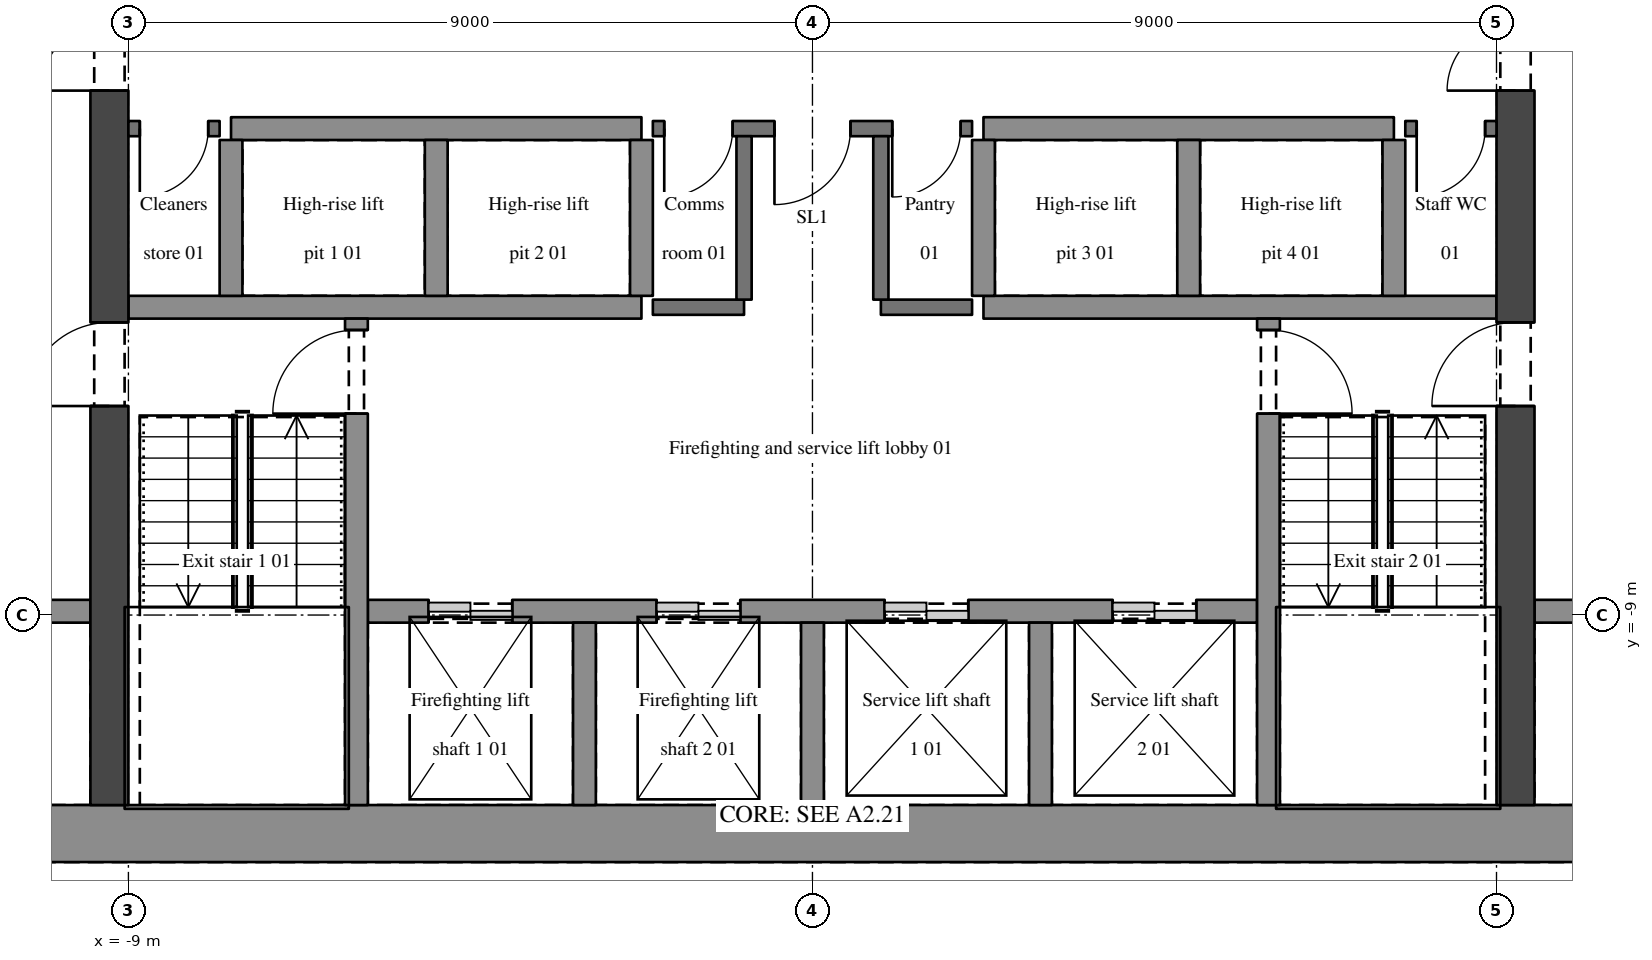
"""IFC4 building model, lengths in metres.
Left out: names, types, materials, properties, quantities, classifications, styles, units other than length and angle.
Written with IfcOpenShell. Run it as: python <this file> out.ifc"""

import sys

from ifc_helpers import new_model, si_unit, direction, frame, frame_2d, origin, place, context, subcontext, project, spatial, rectangle, extrude, element, fill, save


model = new_model("IFC4")
c1 = context("Model", 3, precision=1e-05, world=origin(), true_north=direction((0.0, 1.0)))
c2 = subcontext(c1, "Body", "Model", "MODEL_VIEW")
j1 = project(units=[si_unit("LENGTHUNIT", "METRE"), si_unit("PLANEANGLEUNIT", "RADIAN")], contexts=[c1])
p1 = place(None, origin())
s1 = spatial("IfcSite", under=j1, at=p1, CompositionType="ELEMENT")
p2 = place(p1, origin())
s2 = spatial("IfcBuilding", under=s1, at=p2, CompositionType="ELEMENT")
p3 = place(p2, frame((0.0, 0.0, 158.9)))
s3 = spatial("IfcBuildingStorey", under=s2, at=p3, CompositionType="ELEMENT", Elevation=158.9)
p4 = place(p3, frame((-13.0, -11.875, 0.0), z_axis=(0.0, 0.0, 1.0), x_axis=(1.0, 0.0, 0.0)))
e1 = element("IfcWall", 1, at=p4, inside=s3, PredefinedType="SHEAR", context=c2, shape_type="SweptSolid", body=[
    extrude(rectangle(XDim=26.0, YDim=0.75, at=frame_2d((13.0, 0.0))), origin(), (0.0, 0.0, 1.0), 3.4),
])
p5 = place(p3, frame((-9.25, -11.5, 0.0), z_axis=(0.0, 0.0, 1.0), x_axis=(0.0, 1.0, 0.0)))
e2 = element("IfcWall", 2, at=p5, inside=s3, PredefinedType="SHEAR", context=c2, shape_type="SweptSolid", body=[
    extrude(rectangle(XDim=11.65, YDim=0.5, at=frame_2d((5.825, 0.0))), origin(), (0.0, 0.0, 1.0), 3.4),
])
p6 = place(p5, frame((9.4, 0.0, 0.0)))
e3 = element("IfcOpeningElement", 3, at=p6, cuts=e2, PredefinedType="OPENING", context=c2, shape_type="SweptSolid", body=[
    extrude(rectangle(XDim=1.8, YDim=2.1, at=frame_2d((0.9, 1.05))), frame((0.0, 0.26, 0.0), z_axis=(0.0, -1.0, 0.0), x_axis=(1.0, 0.0, 0.0)), (0.0, 0.0, 1.0), 0.52),
])
p7 = place(p5, frame((5.25, 0.0, 0.0)))
e4 = element("IfcOpeningElement", 4, at=p7, cuts=e2, PredefinedType="OPENING", context=c2, shape_type="SweptSolid", body=[
    extrude(rectangle(XDim=1.1, YDim=2.1, at=frame_2d((0.55, 1.05))), frame((0.0, 0.26, 0.0), z_axis=(0.0, -1.0, 0.0), x_axis=(1.0, 0.0, 0.0)), (0.0, 0.0, 1.0), 0.52),
])
p8 = place(p3, frame((9.25, -11.5, 0.0), z_axis=(0.0, 0.0, 1.0), x_axis=(0.0, 1.0, 0.0)))
e5 = element("IfcWall", 5, at=p8, inside=s3, PredefinedType="SHEAR", context=c2, shape_type="SweptSolid", body=[
    extrude(rectangle(XDim=11.65, YDim=0.5, at=frame_2d((5.825, 0.0))), origin(), (0.0, 0.0, 1.0), 3.4),
])
p9 = place(p8, frame((9.4, 0.0, 0.0)))
e6 = element("IfcOpeningElement", 6, at=p9, cuts=e5, PredefinedType="OPENING", context=c2, shape_type="SweptSolid", body=[
    extrude(rectangle(XDim=1.8, YDim=2.1, at=frame_2d((0.9, 1.05))), frame((0.0, 0.26, 0.0), z_axis=(0.0, -1.0, 0.0), x_axis=(1.0, 0.0, 0.0)), (0.0, 0.0, 1.0), 0.52),
])
p10 = place(p8, frame((5.25, 0.0, 0.0)))
e7 = element("IfcOpeningElement", 7, at=p10, cuts=e5, PredefinedType="OPENING", context=c2, shape_type="SweptSolid", body=[
    extrude(rectangle(XDim=1.1, YDim=2.1, at=frame_2d((0.55, 1.05))), frame((0.0, 0.26, 0.0), z_axis=(0.0, -1.0, 0.0), x_axis=(1.0, 0.0, 0.0)), (0.0, 0.0, 1.0), 0.52),
])
p11 = place(p3, frame((-12.25, -8.95, 0.0), z_axis=(0.0, 0.0, 1.0), x_axis=(1.0, 0.0, 0.0)))
e8 = element("IfcWall", 8, at=p11, inside=s3, PredefinedType="SHEAR", context=c2, shape_type="SweptSolid", body=[
    extrude(rectangle(XDim=2.75, YDim=0.3, at=frame_2d((1.375, 0.0))), origin(), (0.0, 0.0, 1.0), 3.4),
])
p12 = place(p3, frame((-5.85, -8.95, 0.0), z_axis=(0.0, 0.0, 1.0), x_axis=(1.0, 0.0, 0.0)))
e9 = element("IfcWall", 9, at=p12, inside=s3, PredefinedType="SHEAR", context=c2, shape_type="SweptSolid", body=[
    extrude(rectangle(XDim=11.7, YDim=0.3, at=frame_2d((5.85, 0.0))), origin(), (0.0, 0.0, 1.0), 3.4),
])
p13 = place(p12, frame((0.8, 0.0, 0.0)))
e10 = element("IfcOpeningElement", 10, at=p13, cuts=e9, PredefinedType="OPENING", context=c2, shape_type="SweptSolid", body=[
    extrude(rectangle(XDim=1.1, YDim=2.1, at=frame_2d((0.55, 1.05))), frame((0.0, 0.16, 0.0), z_axis=(0.0, -1.0, 0.0), x_axis=(1.0, 0.0, 0.0)), (0.0, 0.0, 1.0), 0.32),
])
p14 = place(p12, frame((3.8, 0.0, 0.0)))
e11 = element("IfcOpeningElement", 11, at=p14, cuts=e9, PredefinedType="OPENING", context=c2, shape_type="SweptSolid", body=[
    extrude(rectangle(XDim=1.1, YDim=2.1, at=frame_2d((0.55, 1.05))), frame((0.0, 0.16, 0.0), z_axis=(0.0, -1.0, 0.0), x_axis=(1.0, 0.0, 0.0)), (0.0, 0.0, 1.0), 0.32),
])
p15 = place(p12, frame((6.8, 0.0, 0.0)))
e12 = element("IfcOpeningElement", 12, at=p15, cuts=e9, PredefinedType="OPENING", context=c2, shape_type="SweptSolid", body=[
    extrude(rectangle(XDim=1.1, YDim=2.1, at=frame_2d((0.55, 1.05))), frame((0.0, 0.16, 0.0), z_axis=(0.0, -1.0, 0.0), x_axis=(1.0, 0.0, 0.0)), (0.0, 0.0, 1.0), 0.32),
])
p16 = place(p12, frame((9.8, 0.0, 0.0)))
e13 = element("IfcOpeningElement", 13, at=p16, cuts=e9, PredefinedType="OPENING", context=c2, shape_type="SweptSolid", body=[
    extrude(rectangle(XDim=1.1, YDim=2.1, at=frame_2d((0.55, 1.05))), frame((0.0, 0.16, 0.0), z_axis=(0.0, -1.0, 0.0), x_axis=(1.0, 0.0, 0.0)), (0.0, 0.0, 1.0), 0.32),
])
p17 = place(p3, frame((9.5, -8.95, 0.0), z_axis=(0.0, 0.0, 1.0), x_axis=(1.0, 0.0, 0.0)))
e14 = element("IfcWall", 14, at=p17, inside=s3, PredefinedType="SHEAR", context=c2, shape_type="SweptSolid", body=[
    extrude(rectangle(XDim=2.75, YDim=0.3, at=frame_2d((1.375, 0.0))), origin(), (0.0, 0.0, 1.0), 3.4),
])
p18 = place(p3, frame((-9.0, -4.95, 0.0), z_axis=(0.0, 0.0, 1.0), x_axis=(1.0, 0.0, 0.0)))
e15 = element("IfcWall", 15, at=p18, inside=s3, PredefinedType="SHEAR", context=c2, shape_type="SweptSolid", body=[
    extrude(rectangle(XDim=6.75, YDim=0.3, at=frame_2d((3.375, 0.0))), origin(), (0.0, 0.0, 1.0), 3.4),
])
for number, where, z_axis, x_axis in (
    (16, (-2.1, -4.95, 0.0), (0.0, 0.0, 1.0), (1.0, 0.0, 0.0)),
    (17, (0.9, -4.95, 0.0), (0.0, 0.0, 1.0), (1.0, 0.0, 0.0)),
):
    element("IfcWall", number, at=place(p3, frame(where, z_axis=z_axis, x_axis=x_axis)), inside=s3, PredefinedType="SOLIDWALL", context=c2, shape_type="SweptSolid", body=[
        extrude(rectangle(XDim=1.2, YDim=0.2, at=frame_2d((0.6, 0.0))), origin(), (0.0, 0.0, 1.0), 3.1),
    ])
p19 = place(p3, frame((2.25, -4.95, 0.0), z_axis=(0.0, 0.0, 1.0), x_axis=(1.0, 0.0, 0.0)))
e18 = element("IfcWall", 18, at=p19, inside=s3, PredefinedType="SHEAR", context=c2, shape_type="SweptSolid", body=[
    extrude(rectangle(XDim=6.75, YDim=0.3, at=frame_2d((3.375, 0.0))), origin(), (0.0, 0.0, 1.0), 3.4),
])
p20 = place(p3, frame((-7.8, -2.6, 0.0), z_axis=(0.0, 0.0, 1.0), x_axis=(-1.0, 0.0, 0.0)))
e19 = element("IfcWall", 19, at=p20, inside=s3, PredefinedType="SOLIDWALL", context=c2, shape_type="SweptSolid", body=[
    extrude(rectangle(XDim=1.2, YDim=0.2, at=frame_2d((0.6, 0.0))), origin(), (0.0, 0.0, 1.0), 3.1),
])
p21 = place(p20, frame((0.15, 0.0, 0.0)))
e20 = element("IfcOpeningElement", 20, at=p21, cuts=e19, PredefinedType="OPENING", context=c2, shape_type="SweptSolid", body=[
    extrude(rectangle(XDim=0.9, YDim=2.1, at=frame_2d((0.45, 1.05))), frame((0.0, 0.11, 0.0), z_axis=(0.0, -1.0, 0.0), x_axis=(1.0, 0.0, 0.0)), (0.0, 0.0, 1.0), 0.22),
])
p22 = place(p3, frame((-7.65, -2.6, 0.0), z_axis=(0.0, 0.0, 1.0), x_axis=(1.0, 0.0, 0.0)))
e21 = element("IfcWall", 21, at=p22, inside=s3, PredefinedType="SHEAR", context=c2, shape_type="SweptSolid", body=[
    extrude(rectangle(XDim=5.4, YDim=0.3, at=frame_2d((2.7, 0.0))), origin(), (0.0, 0.0, 1.0), 3.4),
])
p23 = place(p3, frame((2.1, -2.6, 0.0), z_axis=(0.0, 0.0, 1.0), x_axis=(-1.0, 0.0, 0.0)))
e22 = element("IfcWall", 22, at=p23, inside=s3, PredefinedType="SOLIDWALL", context=c2, shape_type="SweptSolid", body=[
    extrude(rectangle(XDim=4.2, YDim=0.2, at=frame_2d((2.1, 0.0))), origin(), (0.0, 0.0, 1.0), 3.1),
])
p24 = place(p23, frame((1.6, 0.0, 0.0)))
e23 = element("IfcOpeningElement", 23, at=p24, cuts=e22, PredefinedType="OPENING", context=c2, shape_type="SweptSolid", body=[
    extrude(rectangle(XDim=1.0, YDim=2.1, at=frame_2d((0.5, 1.05))), frame((0.0, 0.11, 0.0), z_axis=(0.0, -1.0, 0.0), x_axis=(1.0, 0.0, 0.0)), (0.0, 0.0, 1.0), 0.22),
])
p25 = place(p23, frame((3.15, 0.0, 0.0)))
e24 = element("IfcOpeningElement", 24, at=p25, cuts=e22, PredefinedType="OPENING", context=c2, shape_type="SweptSolid", body=[
    extrude(rectangle(XDim=0.9, YDim=2.1, at=frame_2d((0.45, 1.05))), frame((0.0, 0.11, 0.0), z_axis=(0.0, -1.0, 0.0), x_axis=(1.0, 0.0, 0.0)), (0.0, 0.0, 1.0), 0.22),
])
p26 = place(p23, frame((0.15, 0.0, 0.0)))
e25 = element("IfcOpeningElement", 25, at=p26, cuts=e22, PredefinedType="OPENING", context=c2, shape_type="SweptSolid", body=[
    extrude(rectangle(XDim=0.9, YDim=2.1, at=frame_2d((0.45, 1.05))), frame((0.0, 0.11, 0.0), z_axis=(0.0, -1.0, 0.0), x_axis=(1.0, 0.0, 0.0)), (0.0, 0.0, 1.0), 0.22),
])
p27 = place(p3, frame((2.25, -2.6, 0.0), z_axis=(0.0, 0.0, 1.0), x_axis=(1.0, 0.0, 0.0)))
e26 = element("IfcWall", 26, at=p27, inside=s3, PredefinedType="SHEAR", context=c2, shape_type="SweptSolid", body=[
    extrude(rectangle(XDim=5.4, YDim=0.3, at=frame_2d((2.7, 0.0))), origin(), (0.0, 0.0, 1.0), 3.4),
])
p28 = place(p3, frame((9.0, -2.6, 0.0), z_axis=(0.0, 0.0, 1.0), x_axis=(-1.0, 0.0, 0.0)))
e27 = element("IfcWall", 27, at=p28, inside=s3, PredefinedType="SOLIDWALL", context=c2, shape_type="SweptSolid", body=[
    extrude(rectangle(XDim=1.2, YDim=0.2, at=frame_2d((0.6, 0.0))), origin(), (0.0, 0.0, 1.0), 3.1),
])
p29 = place(p28, frame((0.15, 0.0, 0.0)))
e28 = element("IfcOpeningElement", 28, at=p29, cuts=e27, PredefinedType="OPENING", context=c2, shape_type="SweptSolid", body=[
    extrude(rectangle(XDim=0.9, YDim=2.1, at=frame_2d((0.45, 1.05))), frame((0.0, 0.11, 0.0), z_axis=(0.0, -1.0, 0.0), x_axis=(1.0, 0.0, 0.0)), (0.0, 0.0, 1.0), 0.22),
])
p30 = place(p3, frame((-7.65, -4.8, 0.0), z_axis=(0.0, 0.0, 1.0), x_axis=(0.0, 1.0, 0.0)))
e29 = element("IfcWall", 29, at=p30, inside=s3, PredefinedType="SHEAR", context=c2, shape_type="SweptSolid", body=[
    extrude(rectangle(XDim=2.05, YDim=0.3, at=frame_2d((1.025, 0.0))), origin(), (0.0, 0.0, 1.0), 3.4),
])
p31 = place(p3, frame((-6.0, -11.5, 0.0), z_axis=(0.0, 0.0, 1.0), x_axis=(0.0, 1.0, 0.0)))
e30 = element("IfcWall", 30, at=p31, inside=s3, PredefinedType="SHEAR", context=c2, shape_type="SweptSolid", body=[
    extrude(rectangle(XDim=6.4, YDim=0.3, at=frame_2d((3.2, 0.0))), origin(), (0.0, 0.0, 1.0), 3.4),
])
p32 = place(p31, frame((5.15, 0.0, 0.0)))
e31 = element("IfcOpeningElement", 31, at=p32, cuts=e30, PredefinedType="OPENING", context=c2, shape_type="SweptSolid", body=[
    extrude(rectangle(XDim=1.1, YDim=2.1, at=frame_2d((0.55, 1.05))), frame((0.0, 0.16, 0.0), z_axis=(0.0, -1.0, 0.0), x_axis=(1.0, 0.0, 0.0)), (0.0, 0.0, 1.0), 0.32),
])
p33 = place(p3, frame((-4.95, -4.8, 0.0), z_axis=(0.0, 0.0, 1.0), x_axis=(0.0, 1.0, 0.0)))
e32 = element("IfcWall", 32, at=p33, inside=s3, PredefinedType="SHEAR", context=c2, shape_type="SweptSolid", body=[
    extrude(rectangle(XDim=2.05, YDim=0.3, at=frame_2d((1.025, 0.0))), origin(), (0.0, 0.0, 1.0), 3.4),
])
p34 = place(p3, frame((-3.0, -11.5, 0.0), z_axis=(0.0, 0.0, 1.0), x_axis=(0.0, 1.0, 0.0)))
e33 = element("IfcWall", 33, at=p34, inside=s3, PredefinedType="SHEAR", context=c2, shape_type="SweptSolid", body=[
    extrude(rectangle(XDim=2.4, YDim=0.3, at=frame_2d((1.2, 0.0))), origin(), (0.0, 0.0, 1.0), 3.4),
])
p35 = place(p3, frame((-2.25, -4.8, 0.0), z_axis=(0.0, 0.0, 1.0), x_axis=(0.0, 1.0, 0.0)))
e34 = element("IfcWall", 34, at=p35, inside=s3, PredefinedType="SHEAR", context=c2, shape_type="SweptSolid", body=[
    extrude(rectangle(XDim=2.05, YDim=0.3, at=frame_2d((1.025, 0.0))), origin(), (0.0, 0.0, 1.0), 3.4),
])
p36 = place(p3, frame((-0.9, -4.85, 0.0), z_axis=(0.0, 0.0, 1.0), x_axis=(0.0, 1.0, 0.0)))
e35 = element("IfcWall", 35, at=p36, inside=s3, PredefinedType="SOLIDWALL", context=c2, shape_type="SweptSolid", body=[
    extrude(rectangle(XDim=2.15, YDim=0.2, at=frame_2d((1.075, 0.0))), origin(), (0.0, 0.0, 1.0), 3.1),
])
p37 = place(p3, frame((0.0, -11.5, 0.0), z_axis=(0.0, 0.0, 1.0), x_axis=(0.0, 1.0, 0.0)))
e36 = element("IfcWall", 36, at=p37, inside=s3, PredefinedType="SHEAR", context=c2, shape_type="SweptSolid", body=[
    extrude(rectangle(XDim=2.4, YDim=0.3, at=frame_2d((1.2, 0.0))), origin(), (0.0, 0.0, 1.0), 3.4),
])
p38 = place(p3, frame((0.9, -4.85, 0.0), z_axis=(0.0, 0.0, 1.0), x_axis=(0.0, 1.0, 0.0)))
e37 = element("IfcWall", 37, at=p38, inside=s3, PredefinedType="SOLIDWALL", context=c2, shape_type="SweptSolid", body=[
    extrude(rectangle(XDim=2.15, YDim=0.2, at=frame_2d((1.075, 0.0))), origin(), (0.0, 0.0, 1.0), 3.1),
])
p39 = place(p3, frame((2.25, -4.8, 0.0), z_axis=(0.0, 0.0, 1.0), x_axis=(0.0, 1.0, 0.0)))
e38 = element("IfcWall", 38, at=p39, inside=s3, PredefinedType="SHEAR", context=c2, shape_type="SweptSolid", body=[
    extrude(rectangle(XDim=2.05, YDim=0.3, at=frame_2d((1.025, 0.0))), origin(), (0.0, 0.0, 1.0), 3.4),
])
p40 = place(p3, frame((3.0, -11.5, 0.0), z_axis=(0.0, 0.0, 1.0), x_axis=(0.0, 1.0, 0.0)))
e39 = element("IfcWall", 39, at=p40, inside=s3, PredefinedType="SHEAR", context=c2, shape_type="SweptSolid", body=[
    extrude(rectangle(XDim=2.4, YDim=0.3, at=frame_2d((1.2, 0.0))), origin(), (0.0, 0.0, 1.0), 3.4),
])
p41 = place(p3, frame((4.95, -4.8, 0.0), z_axis=(0.0, 0.0, 1.0), x_axis=(0.0, 1.0, 0.0)))
e40 = element("IfcWall", 40, at=p41, inside=s3, PredefinedType="SHEAR", context=c2, shape_type="SweptSolid", body=[
    extrude(rectangle(XDim=2.05, YDim=0.3, at=frame_2d((1.025, 0.0))), origin(), (0.0, 0.0, 1.0), 3.4),
])
p42 = place(p3, frame((6.0, -5.1, 0.0), z_axis=(0.0, 0.0, 1.0), x_axis=(0.0, -1.0, 0.0)))
e41 = element("IfcWall", 41, at=p42, inside=s3, PredefinedType="SHEAR", context=c2, shape_type="SweptSolid", body=[
    extrude(rectangle(XDim=6.4, YDim=0.3, at=frame_2d((3.2, 0.0))), origin(), (0.0, 0.0, 1.0), 3.4),
])
p43 = place(p42, frame((0.15, 0.0, 0.0)))
e42 = element("IfcOpeningElement", 42, at=p43, cuts=e41, PredefinedType="OPENING", context=c2, shape_type="SweptSolid", body=[
    extrude(rectangle(XDim=1.1, YDim=2.1, at=frame_2d((0.55, 1.05))), frame((0.0, 0.16, 0.0), z_axis=(0.0, -1.0, 0.0), x_axis=(1.0, 0.0, 0.0)), (0.0, 0.0, 1.0), 0.32),
])
p44 = place(p3, frame((7.65, -4.8, 0.0), z_axis=(0.0, 0.0, 1.0), x_axis=(0.0, 1.0, 0.0)))
e43 = element("IfcWall", 43, at=p44, inside=s3, PredefinedType="SHEAR", context=c2, shape_type="SweptSolid", body=[
    extrude(rectangle(XDim=2.05, YDim=0.3, at=frame_2d((1.025, 0.0))), origin(), (0.0, 0.0, 1.0), 3.4),
])
p45 = place(p9, origin())
e44 = element("IfcDoor", 44, at=p45, inside=s3, OperationType="DOUBLE_DOOR_SINGLE_SWING", PredefinedType="DOOR", context=c2, shape_type="SweptSolid", body=[
    extrude(rectangle(XDim=1.8, YDim=2.1, at=frame_2d((0.9, 1.05))), frame((0.0, 0.025, 0.0), z_axis=(0.0, -1.0, 0.0), x_axis=(1.0, 0.0, 0.0)), (0.0, 0.0, 1.0), 0.05),
])
fill(e6, e44)
p46 = place(p6, origin())
e45 = element("IfcDoor", 45, at=p46, inside=s3, OperationType="DOUBLE_DOOR_SINGLE_SWING", PredefinedType="DOOR", context=c2, shape_type="SweptSolid", body=[
    extrude(rectangle(XDim=1.8, YDim=2.1, at=frame_2d((0.9, 1.05))), frame((0.0, 0.025, 0.0), z_axis=(0.0, -1.0, 0.0), x_axis=(1.0, 0.0, 0.0)), (0.0, 0.0, 1.0), 0.05),
])
fill(e3, e45)
p47 = place(p24, origin())
e46 = element("IfcDoor", 46, at=p47, inside=s3, OperationType="SINGLE_SWING_RIGHT", PredefinedType="DOOR", context=c2, shape_type="SweptSolid", body=[
    extrude(rectangle(XDim=1.0, YDim=2.1, at=frame_2d((0.5, 1.05))), frame((0.0, 0.025, 0.0), z_axis=(0.0, -1.0, 0.0), x_axis=(1.0, 0.0, 0.0)), (0.0, 0.0, 1.0), 0.05),
])
fill(e23, e46)
p48 = place(p32, origin())
e47 = element("IfcDoor", 47, at=p48, inside=s3, OperationType="SINGLE_SWING_LEFT", PredefinedType="DOOR", context=c2, shape_type="SweptSolid", body=[
    extrude(rectangle(XDim=1.1, YDim=2.1, at=frame_2d((0.55, 1.05))), frame((0.0, 0.025, 0.0), z_axis=(0.0, -1.0, 0.0), x_axis=(1.0, 0.0, 0.0)), (0.0, 0.0, 1.0), 0.05),
])
fill(e31, e47)
p49 = place(p7, origin())
e48 = element("IfcDoor", 48, at=p49, inside=s3, OperationType="SINGLE_SWING_LEFT", PredefinedType="DOOR", context=c2, shape_type="SweptSolid", body=[
    extrude(rectangle(XDim=1.1, YDim=2.1, at=frame_2d((0.55, 1.05))), frame((0.0, 0.025, 0.0), z_axis=(0.0, -1.0, 0.0), x_axis=(1.0, 0.0, 0.0)), (0.0, 0.0, 1.0), 0.05),
])
fill(e4, e48)
p50 = place(p43, origin())
e49 = element("IfcDoor", 49, at=p50, inside=s3, OperationType="SINGLE_SWING_RIGHT", PredefinedType="DOOR", context=c2, shape_type="SweptSolid", body=[
    extrude(rectangle(XDim=1.1, YDim=2.1, at=frame_2d((0.55, 1.05))), frame((0.0, 0.025, 0.0), z_axis=(0.0, -1.0, 0.0), x_axis=(1.0, 0.0, 0.0)), (0.0, 0.0, 1.0), 0.05),
])
fill(e42, e49)
p51 = place(p10, origin())
e50 = element("IfcDoor", 50, at=p51, inside=s3, OperationType="SINGLE_SWING_LEFT", PredefinedType="DOOR", context=c2, shape_type="SweptSolid", body=[
    extrude(rectangle(XDim=1.1, YDim=2.1, at=frame_2d((0.55, 1.05))), frame((0.0, 0.025, 0.0), z_axis=(0.0, -1.0, 0.0), x_axis=(1.0, 0.0, 0.0)), (0.0, 0.0, 1.0), 0.05),
])
fill(e7, e50)
p52 = place(p25, origin())
e51 = element("IfcDoor", 51, at=p52, inside=s3, OperationType="SINGLE_SWING_RIGHT", PredefinedType="DOOR", context=c2, shape_type="SweptSolid", body=[
    extrude(rectangle(XDim=0.9, YDim=2.1, at=frame_2d((0.45, 1.05))), frame((0.0, 0.025, 0.0), z_axis=(0.0, -1.0, 0.0), x_axis=(1.0, 0.0, 0.0)), (0.0, 0.0, 1.0), 0.05),
])
fill(e24, e51)
p53 = place(p26, origin())
e52 = element("IfcDoor", 52, at=p53, inside=s3, OperationType="SINGLE_SWING_RIGHT", PredefinedType="DOOR", context=c2, shape_type="SweptSolid", body=[
    extrude(rectangle(XDim=0.9, YDim=2.1, at=frame_2d((0.45, 1.05))), frame((0.0, 0.025, 0.0), z_axis=(0.0, -1.0, 0.0), x_axis=(1.0, 0.0, 0.0)), (0.0, 0.0, 1.0), 0.05),
])
fill(e25, e52)
p54 = place(p29, origin())
e53 = element("IfcDoor", 53, at=p54, inside=s3, OperationType="SINGLE_SWING_RIGHT", PredefinedType="DOOR", context=c2, shape_type="SweptSolid", body=[
    extrude(rectangle(XDim=0.9, YDim=2.1, at=frame_2d((0.45, 1.05))), frame((0.0, 0.025, 0.0), z_axis=(0.0, -1.0, 0.0), x_axis=(1.0, 0.0, 0.0)), (0.0, 0.0, 1.0), 0.05),
])
fill(e28, e53)
p55 = place(p21, origin())
e54 = element("IfcDoor", 54, at=p55, inside=s3, OperationType="SINGLE_SWING_RIGHT", PredefinedType="DOOR", context=c2, shape_type="SweptSolid", body=[
    extrude(rectangle(XDim=0.9, YDim=2.1, at=frame_2d((0.45, 1.05))), frame((0.0, 0.025, 0.0), z_axis=(0.0, -1.0, 0.0), x_axis=(1.0, 0.0, 0.0)), (0.0, 0.0, 1.0), 0.05),
])
fill(e20, e54)
p56 = place(p13, origin())
e55 = element("IfcDoor", 55, at=p56, inside=s3, OperationType="DOUBLE_DOOR_SLIDING", PredefinedType="DOOR", context=c2, shape_type="SweptSolid", body=[
    extrude(rectangle(XDim=1.1, YDim=2.1, at=frame_2d((0.55, 1.05))), frame((0.0, 0.025, 0.0), z_axis=(0.0, -1.0, 0.0), x_axis=(1.0, 0.0, 0.0)), (0.0, 0.0, 1.0), 0.05),
])
fill(e10, e55)
p57 = place(p14, origin())
e56 = element("IfcDoor", 56, at=p57, inside=s3, OperationType="DOUBLE_DOOR_SLIDING", PredefinedType="DOOR", context=c2, shape_type="SweptSolid", body=[
    extrude(rectangle(XDim=1.1, YDim=2.1, at=frame_2d((0.55, 1.05))), frame((0.0, 0.025, 0.0), z_axis=(0.0, -1.0, 0.0), x_axis=(1.0, 0.0, 0.0)), (0.0, 0.0, 1.0), 0.05),
])
fill(e11, e56)
p58 = place(p15, origin())
e57 = element("IfcDoor", 57, at=p58, inside=s3, OperationType="DOUBLE_DOOR_SLIDING", PredefinedType="DOOR", context=c2, shape_type="SweptSolid", body=[
    extrude(rectangle(XDim=1.1, YDim=2.1, at=frame_2d((0.55, 1.05))), frame((0.0, 0.025, 0.0), z_axis=(0.0, -1.0, 0.0), x_axis=(1.0, 0.0, 0.0)), (0.0, 0.0, 1.0), 0.05),
])
fill(e12, e57)
p59 = place(p16, origin())
e58 = element("IfcDoor", 58, at=p59, inside=s3, OperationType="DOUBLE_DOOR_SLIDING", PredefinedType="DOOR", context=c2, shape_type="SweptSolid", body=[
    extrude(rectangle(XDim=1.1, YDim=2.1, at=frame_2d((0.55, 1.05))), frame((0.0, 0.025, 0.0), z_axis=(0.0, -1.0, 0.0), x_axis=(1.0, 0.0, 0.0)), (0.0, 0.0, 1.0), 0.05),
])
fill(e13, e58)
save(model, sys.argv[1])
